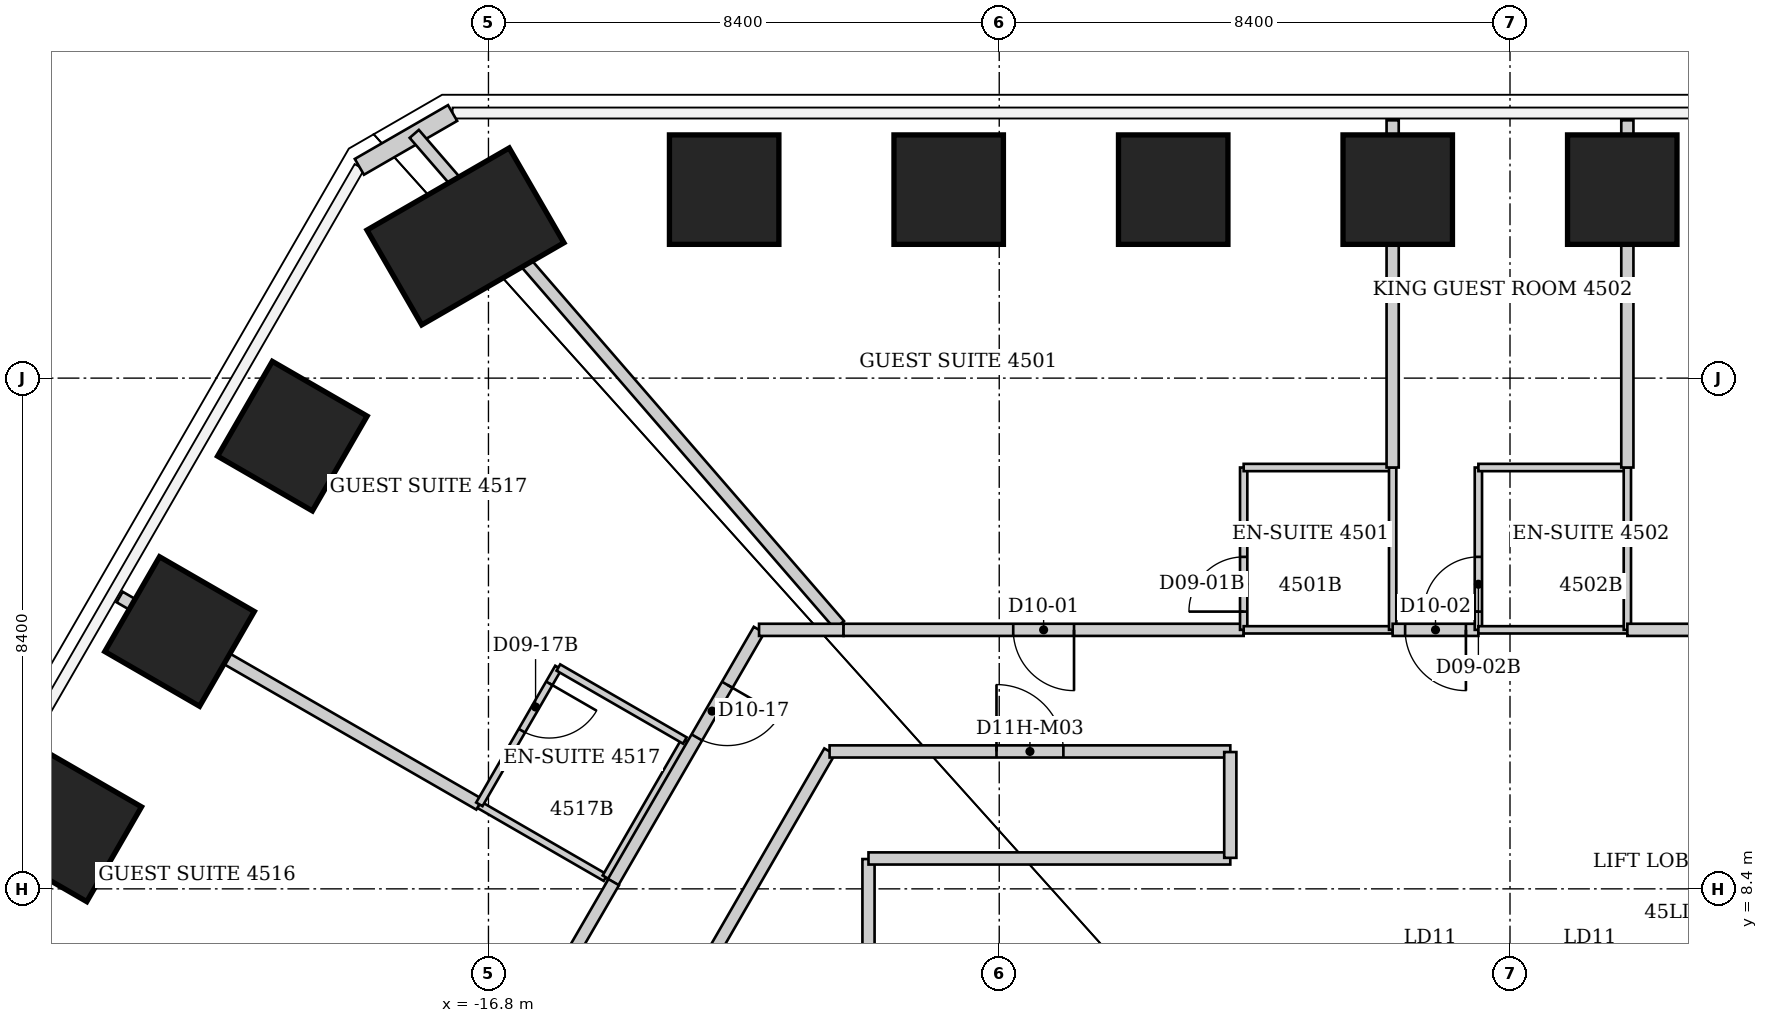
"""IFC4 building model, lengths in metres.
Left out: names, types, materials, properties, quantities, classifications, styles, units other than length and angle.
Written with IfcOpenShell. Run it as: python <this file> out.ifc"""

import sys

from ifc_helpers import new_model, si_unit, direction, frame, frame_2d, origin, origin_2d, place, context, subcontext, project, spatial, rectangle, extrude, element, fill, save


model = new_model("IFC4")
c1 = context("Model", 3, precision=1e-05, world=origin(), true_north=direction((0.0, 1.0)))
c2 = subcontext(c1, "Body", "Model", "MODEL_VIEW")
j1 = project(units=[si_unit("LENGTHUNIT", "METRE"), si_unit("PLANEANGLEUNIT", "RADIAN")], contexts=[c1])
p1 = place(None, origin())
s1 = spatial("IfcSite", under=j1, at=p1, CompositionType="ELEMENT")
p2 = place(p1, origin())
s2 = spatial("IfcBuilding", under=s1, at=p2, CompositionType="ELEMENT")
p3 = place(p2, frame((0.0, 0.0, 183.2)))
s3 = spatial("IfcBuildingStorey", under=s2, at=p3, CompositionType="ELEMENT", Elevation=183.2)
for number, where, z_axis, x_axis in (
    (1, (-12.924, 19.9, 0.0), (0.0, 0.0, 1.0), (0.0, 1.0, 0.0)),
    (2, (-9.231, 19.9, 0.0), (0.0, 0.0, 1.0), (0.0, 1.0, 0.0)),
    (3, (-5.539, 19.9, 0.0), (0.0, 0.0, 1.0), (0.0, 1.0, 0.0)),
    (4, (-1.846, 19.9, 0.0), (0.0, 0.0, 1.0), (0.0, 1.0, 0.0)),
    (5, (1.846, 19.9, 0.0), (0.0, 0.0, 1.0), (0.0, 1.0, 0.0)),
    (6, (-23.735, 9.419, 0.0), (0.0, 0.0, 1.0), (-0.866, 0.5, 0.0)),
    (7, (-21.88, 12.633, 0.0), (0.0, 0.0, 1.0), (-0.866, 0.5, 0.0)),
    (8, (-20.025, 15.846, 0.0), (0.0, 0.0, 1.0), (-0.866, 0.5, 0.0)),
):
    element("IfcColumn", number, at=place(p3, frame(where, z_axis=z_axis, x_axis=x_axis)), inside=s3, PredefinedType="COLUMN", context=c2, shape_type="SweptSolid", body=[
        extrude(rectangle(XDim=1.8, YDim=1.8, at=origin_2d()), origin(), (0.0, 0.0, 1.0), 3.8),
    ])
p4 = place(p3, frame((-17.178, 19.131, 0.0), z_axis=(0.0, 0.0, 1.0), x_axis=(-0.5, 0.866025403784, 0.0)))
e9 = element("IfcColumn", 9, at=p4, inside=s3, PredefinedType="COLUMN", context=c2, shape_type="SweptSolid", body=[
    extrude(rectangle(XDim=1.8, YDim=2.7, at=origin_2d()), origin(), (0.0, 0.0, 1.0), 3.8),
])
p5 = place(p3, frame((-18.923, 20.275, 0.0), z_axis=(0.0, 0.0, 1.0), x_axis=(0.866036293601, 0.499981137809, 0.0)))
e10 = element("IfcWall", 10, at=p5, inside=s3, PredefinedType="SOLIDWALL", context=c2, shape_type="SweptSolid", body=[
    extrude(rectangle(XDim=1.77, YDim=0.3, at=frame_2d((0.885, 0.0))), origin(), (0.0, 0.0, 1.0), 3.64),
])
p6 = place(p3, frame((-16.954, 9.783, 0.0), z_axis=(0.0, 0.0, 1.0), x_axis=(0.865862137391, -0.500282679124, 0.0)))
e11 = element("IfcWall", 11, at=p6, inside=s3, PredefinedType="PARTITIONING", context=c2, shape_type="SweptSolid", body=[
    extrude(rectangle(XDim=2.401, YDim=0.12, at=frame_2d((1.201, 0.0))), origin(), (0.0, 0.0, 1.0), 2.878),
])
p7 = place(p3, frame((-16.95, 9.79, 0.0), z_axis=(0.0, 0.0, 1.0), x_axis=(-0.866371236465, 0.499400521251, 0.0)))
e12 = element("IfcWall", 12, at=p7, inside=s3, PredefinedType="PARTITIONING", context=c2, shape_type="SweptSolid", body=[
    extrude(rectangle(XDim=6.829, YDim=0.2, at=frame_2d((3.414, 0.0))), origin(), (0.0, 0.0, 1.0), 2.878),
])
p8 = place(p3, frame((-15.65, 12.04, 0.0), z_axis=(0.0, 0.0, 1.0), x_axis=(-0.500291685314, -0.865856933682, 0.0)))
e13 = element("IfcWall", 13, at=p8, inside=s3, PredefinedType="PARTITIONING", context=c2, shape_type="SweptSolid", body=[
    extrude(rectangle(XDim=2.599, YDim=0.12, at=frame_2d((1.299, 0.0))), origin(), (0.0, 0.0, 1.0), 3.64),
])
p9 = place(p8, frame((0.3, 0.0, 0.0)))
e14 = element("IfcOpeningElement", 14, at=p9, cuts=e13, PredefinedType="OPENING", context=c2, shape_type="SweptSolid", body=[
    extrude(rectangle(XDim=0.9, YDim=2.03, at=frame_2d((0.45, 1.015))), frame((0.0, 0.06, 0.0), z_axis=(0.0, -1.0, 0.0), x_axis=(1.0, 0.0, 0.0)), (0.0, 0.0, 1.0), 0.12),
])
p10 = place(p3, frame((-14.87, 8.59, 0.0), z_axis=(0.0, 0.0, 1.0), x_axis=(0.500291685314, 0.865856933682, 0.0)))
e15 = element("IfcWall", 15, at=p10, inside=s3, PredefinedType="PARTITIONING", context=c2, shape_type="SweptSolid", body=[
    extrude(rectangle(XDim=2.599, YDim=0.12, at=frame_2d((1.299, 0.0))), origin(), (0.0, 0.0, 1.0), 3.64),
])
p11 = place(p3, frame((-14.827, 8.554, 0.0), z_axis=(0.0, 0.0, 1.0), x_axis=(0.865865073245, -0.500277597875, 0.0)))
e16 = element("IfcWall", 16, at=p11, inside=s3, PredefinedType="PARTITIONING", context=c2, shape_type="SweptSolid", body=[
    extrude(rectangle(XDim=0.089, YDim=0.2, at=frame_2d((0.044, 0.0))), origin(), (0.0, 0.0, 1.0), 3.64),
])
p12 = place(p3, frame((-14.75, 8.51, 0.0), z_axis=(0.0, 0.0, 1.0), x_axis=(0.500618647881, 0.86566793252, 0.0)))
e17 = element("IfcWall", 17, at=p12, inside=s3, PredefinedType="PARTITIONING", context=c2, shape_type="SweptSolid", body=[
    extrude(rectangle(XDim=4.794, YDim=0.2, at=frame_2d((2.397, 0.0))), origin(), (0.0, 0.0, 1.0), 3.64),
])
p13 = place(p12, frame((2.75, 0.0, 0.0)))
e18 = element("IfcOpeningElement", 18, at=p13, cuts=e17, PredefinedType="OPENING", context=c2, shape_type="SweptSolid", body=[
    extrude(rectangle(XDim=1.0, YDim=2.13, at=frame_2d((0.5, 1.065))), frame((0.0, 0.1, 0.0), z_axis=(0.0, -1.0, 0.0), x_axis=(1.0, 0.0, 0.0)), (0.0, 0.0, 1.0), 0.2),
])
p14 = place(p3, frame((-14.74, 8.51, 0.0), z_axis=(0.0, 0.0, 1.0), x_axis=(-0.501513165407, -0.865150012959, 0.0)))
e19 = element("IfcWall", 19, at=p14, inside=s3, PredefinedType="PARTITIONING", context=c2, shape_type="SweptSolid", body=[
    extrude(rectangle(XDim=4.6, YDim=0.2, at=frame_2d((2.3, 0.0))), origin(), (0.0, 0.0, 1.0), 3.64),
])
p15 = place(p14, frame((1.8, 0.0, 0.0)))
e20 = element("IfcOpeningElement", 20, at=p15, cuts=e19, PredefinedType="OPENING", context=c2, shape_type="SweptSolid", body=[
    extrude(rectangle(XDim=1.0, YDim=2.13, at=frame_2d((0.5, 1.065))), frame((0.0, 0.1, 0.0), z_axis=(0.0, -1.0, 0.0), x_axis=(1.0, 0.0, 0.0)), (0.0, 0.0, 1.0), 0.2),
])
p16 = place(p3, frame((-13.83, 6.09, 0.0), z_axis=(0.0, 0.0, 1.0), x_axis=(0.500248310865, 0.865881993967, 0.0)))
e21 = element("IfcWall", 21, at=p16, inside=s3, PredefinedType="PARTITIONING", context=c2, shape_type="SweptSolid", body=[
    extrude(rectangle(XDim=5.278, YDim=0.2, at=frame_2d((2.639, 0.0))), origin(), (0.0, 0.0, 1.0), 3.64),
])
p17 = place(p3, frame((-13.57, 10.84, 0.0), z_axis=(0.0, 0.0, 1.0), x_axis=(-0.866177122335, 0.499737123639, 0.0)))
e22 = element("IfcWall", 22, at=p17, inside=s3, PredefinedType="PARTITIONING", context=c2, shape_type="SweptSolid", body=[
    extrude(rectangle(XDim=2.401, YDim=0.12, at=frame_2d((1.201, 0.0))), origin(), (0.0, 0.0, 1.0), 3.64),
])
p18 = place(p3, frame((-11.19, 10.66, 0.0), z_axis=(0.0, 0.0, 1.0), x_axis=(1.0, 0.0, 0.0)))
e23 = element("IfcWall", 23, at=p18, inside=s3, PredefinedType="PARTITIONING", context=c2, shape_type="SweptSolid", body=[
    extrude(rectangle(XDim=6.59, YDim=0.2, at=frame_2d((3.295, 0.0))), origin(), (0.0, 0.0, 1.0), 3.64),
])
p19 = place(p18, frame((2.745, 0.0, 0.0)))
e24 = element("IfcOpeningElement", 24, at=p19, cuts=e23, PredefinedType="OPENING", context=c2, shape_type="SweptSolid", body=[
    extrude(rectangle(XDim=1.1, YDim=2.2, at=frame_2d((0.55, 1.1))), frame((0.0, 0.1, 0.0), z_axis=(0.0, -1.0, 0.0), x_axis=(1.0, 0.0, 0.0)), (0.0, 0.0, 1.0), 0.2),
])
p20 = place(p3, frame((-11.029, 12.74, 0.0), z_axis=(0.0, 0.0, 1.0), x_axis=(-0.654429261747, 0.756123231603, 0.0)))
e25 = element("IfcWall", 25, at=p20, inside=s3, PredefinedType="PARTITIONING", context=c2, shape_type="SweptSolid", body=[
    extrude(rectangle(XDim=10.683, YDim=0.2, at=frame_2d((5.342, 0.0))), origin(), (0.0, 0.0, 1.0), 3.64),
])
p21 = place(p3, frame((-10.96, 12.66, 0.0), z_axis=(0.0, 0.0, 1.0), x_axis=(-1.0, 0.0, 0.0)))
e26 = element("IfcWall", 26, at=p21, inside=s3, PredefinedType="PARTITIONING", context=c2, shape_type="SweptSolid", body=[
    extrude(rectangle(XDim=1.39, YDim=0.2, at=frame_2d((0.695, 0.0))), origin(), (0.0, 0.0, 1.0), 3.64),
])
p22 = place(p3, frame((-10.55, 8.89, 0.0), z_axis=(0.0, 0.0, 1.0), x_axis=(0.0, -1.0, 0.0)))
e27 = element("IfcWall", 27, at=p22, inside=s3, PredefinedType="PARTITIONING", context=c2, shape_type="SweptSolid", body=[
    extrude(rectangle(XDim=2.8, YDim=0.2, at=frame_2d((1.4, 0.0))), origin(), (0.0, 0.0, 1.0), 3.64),
])
p23 = place(p3, frame((-4.6, 8.9, 0.0), z_axis=(0.0, 0.0, 1.0), x_axis=(-1.0, 0.0, 0.0)))
e28 = element("IfcWall", 28, at=p23, inside=s3, PredefinedType="PARTITIONING", context=c2, shape_type="SweptSolid", body=[
    extrude(rectangle(XDim=5.95, YDim=0.2, at=frame_2d((2.975, 0.0))), origin(), (0.0, 0.0, 1.0), 3.64),
])
p24 = place(p3, frame((-4.6, 10.65, 0.0), z_axis=(0.0, 0.0, 1.0), x_axis=(0.0, -1.0, 0.0)))
e29 = element("IfcWall", 29, at=p24, inside=s3, PredefinedType="PARTITIONING", context=c2, shape_type="SweptSolid", body=[
    extrude(rectangle(XDim=1.74, YDim=0.2, at=frame_2d((0.87, 0.0))), origin(), (0.0, 0.0, 1.0), 3.64),
])
p25 = place(p3, frame((-4.38, 12.66, 0.0), z_axis=(0.0, 0.0, 1.0), x_axis=(-1.0, 0.0, 0.0)))
e30 = element("IfcWall", 30, at=p25, inside=s3, PredefinedType="PARTITIONING", context=c2, shape_type="SweptSolid", body=[
    extrude(rectangle(XDim=6.58, YDim=0.2, at=frame_2d((3.29, 0.0))), origin(), (0.0, 0.0, 1.0), 3.64),
])
p26 = place(p25, frame((2.79, 0.0, 0.0)))
e31 = element("IfcOpeningElement", 31, at=p26, cuts=e30, PredefinedType="OPENING", context=c2, shape_type="SweptSolid", body=[
    extrude(rectangle(XDim=1.0, YDim=2.13, at=frame_2d((0.5, 1.065))), frame((0.0, 0.1, 0.0), z_axis=(0.0, -1.0, 0.0), x_axis=(1.0, 0.0, 0.0)), (0.0, 0.0, 1.0), 0.2),
])
p27 = place(p3, frame((-4.38, 15.33, 0.0), z_axis=(0.0, 0.0, 1.0), x_axis=(0.0, -1.0, 0.0)))
e32 = element("IfcWall", 32, at=p27, inside=s3, PredefinedType="PARTITIONING", context=c2, shape_type="SweptSolid", body=[
    extrude(rectangle(XDim=2.67, YDim=0.12, at=frame_2d((1.335, 0.0))), origin(), (0.0, 0.0, 1.0), 3.64),
])
p28 = place(p27, frame((1.47, 0.0, 0.0)))
e33 = element("IfcOpeningElement", 33, at=p28, cuts=e32, PredefinedType="OPENING", context=c2, shape_type="SweptSolid", body=[
    extrude(rectangle(XDim=0.9, YDim=2.03, at=frame_2d((0.45, 1.015))), frame((0.0, 0.06, 0.0), z_axis=(0.0, -1.0, 0.0), x_axis=(1.0, 0.0, 0.0)), (0.0, 0.0, 1.0), 0.12),
])
for number, where, z_axis, x_axis in (
    (34, (-1.93, 12.66, 0.0), (0.0, 0.0, 1.0), (-1.0, 0.0, 0.0)),
    (35, (-1.93, 15.33, 0.0), (0.0, 0.0, 1.0), (-1.0, 0.0, 0.0)),
):
    element("IfcWall", number, at=place(p3, frame(where, z_axis=z_axis, x_axis=x_axis)), inside=s3, PredefinedType="PARTITIONING", context=c2, shape_type="SweptSolid", body=[
        extrude(rectangle(XDim=2.45, YDim=0.12, at=frame_2d((1.225, 0.0))), origin(), (0.0, 0.0, 1.0), 3.64),
    ])
p29 = place(p3, frame((-1.93, 15.33, 0.0), z_axis=(0.0, 0.0, 1.0), x_axis=(0.0, -1.0, 0.0)))
e36 = element("IfcWall", 36, at=p29, inside=s3, PredefinedType="PARTITIONING", context=c2, shape_type="SweptSolid", body=[
    extrude(rectangle(XDim=2.67, YDim=0.12, at=frame_2d((1.335, 0.0))), origin(), (0.0, 0.0, 1.0), 3.023),
])
p30 = place(p3, frame((-1.93, 21.04, 0.0), z_axis=(0.0, 0.0, 1.0), x_axis=(0.0, -1.0, 0.0)))
e37 = element("IfcWall", 37, at=p30, inside=s3, PredefinedType="PARTITIONING", context=c2, shape_type="SweptSolid", body=[
    extrude(rectangle(XDim=5.71, YDim=0.2, at=frame_2d((2.855, 0.0))), origin(), (0.0, 0.0, 1.0), 3.023),
])
p31 = place(p3, frame((-0.52, 12.66, 0.0), z_axis=(0.0, 0.0, 1.0), x_axis=(-1.0, 0.0, 0.0)))
e38 = element("IfcWall", 38, at=p31, inside=s3, PredefinedType="PARTITIONING", context=c2, shape_type="SweptSolid", body=[
    extrude(rectangle(XDim=1.41, YDim=0.2, at=frame_2d((0.705, 0.0))), origin(), (0.0, 0.0, 1.0), 3.64),
])
p32 = place(p31, frame((0.205, 0.0, 0.0)))
e39 = element("IfcOpeningElement", 39, at=p32, cuts=e38, PredefinedType="OPENING", context=c2, shape_type="SweptSolid", body=[
    extrude(rectangle(XDim=1.0, YDim=2.13, at=frame_2d((0.5, 1.065))), frame((0.0, 0.1, 0.0), z_axis=(0.0, -1.0, 0.0), x_axis=(1.0, 0.0, 0.0)), (0.0, 0.0, 1.0), 0.2),
])
p33 = place(p3, frame((-0.52, 15.33, 0.0), z_axis=(0.0, 0.0, 1.0), x_axis=(0.0, -1.0, 0.0)))
e40 = element("IfcWall", 40, at=p33, inside=s3, PredefinedType="PARTITIONING", context=c2, shape_type="SweptSolid", body=[
    extrude(rectangle(XDim=2.67, YDim=0.12, at=frame_2d((1.335, 0.0))), origin(), (0.0, 0.0, 1.0), 3.64),
])
p34 = place(p33, frame((1.47, 0.0, 0.0)))
e41 = element("IfcOpeningElement", 41, at=p34, cuts=e40, PredefinedType="OPENING", context=c2, shape_type="SweptSolid", body=[
    extrude(rectangle(XDim=0.9, YDim=2.03, at=frame_2d((0.45, 1.015))), frame((0.0, 0.06, 0.0), z_axis=(0.0, -1.0, 0.0), x_axis=(1.0, 0.0, 0.0)), (0.0, 0.0, 1.0), 0.12),
])
for number, where, z_axis, x_axis in (
    (42, (1.93, 12.66, 0.0), (0.0, 0.0, 1.0), (-1.0, 0.0, 0.0)),
    (43, (1.93, 15.33, 0.0), (0.0, 0.0, 1.0), (-1.0, 0.0, 0.0)),
):
    element("IfcWall", number, at=place(p3, frame(where, z_axis=z_axis, x_axis=x_axis)), inside=s3, PredefinedType="PARTITIONING", context=c2, shape_type="SweptSolid", body=[
        extrude(rectangle(XDim=2.45, YDim=0.12, at=frame_2d((1.225, 0.0))), origin(), (0.0, 0.0, 1.0), 3.64),
    ])
p35 = place(p3, frame((1.93, 15.33, 0.0), z_axis=(0.0, 0.0, 1.0), x_axis=(0.0, -1.0, 0.0)))
e44 = element("IfcWall", 44, at=p35, inside=s3, PredefinedType="PARTITIONING", context=c2, shape_type="SweptSolid", body=[
    extrude(rectangle(XDim=2.67, YDim=0.12, at=frame_2d((1.335, 0.0))), origin(), (0.0, 0.0, 1.0), 3.023),
])
p36 = place(p3, frame((1.93, 21.04, 0.0), z_axis=(0.0, 0.0, 1.0), x_axis=(0.0, -1.0, 0.0)))
e45 = element("IfcWall", 45, at=p36, inside=s3, PredefinedType="PARTITIONING", context=c2, shape_type="SweptSolid", body=[
    extrude(rectangle(XDim=5.71, YDim=0.2, at=frame_2d((2.855, 0.0))), origin(), (0.0, 0.0, 1.0), 3.023),
])
p37 = place(p3, frame((8.53, 12.66, 0.0), z_axis=(0.0, 0.0, 1.0), x_axis=(-1.0, 0.0, 0.0)))
e46 = element("IfcWall", 46, at=p37, inside=s3, PredefinedType="PARTITIONING", context=c2, shape_type="SweptSolid", body=[
    extrude(rectangle(XDim=6.6, YDim=0.2, at=frame_2d((3.3, 0.0))), origin(), (0.0, 0.0, 1.0), 3.64),
])
p38 = place(p37, frame((2.8, 0.0, 0.0)))
e47 = element("IfcOpeningElement", 47, at=p38, cuts=e46, PredefinedType="OPENING", context=c2, shape_type="SweptSolid", body=[
    extrude(rectangle(XDim=1.0, YDim=2.13, at=frame_2d((0.5, 1.065))), frame((0.0, 0.1, 0.0), z_axis=(0.0, -1.0, 0.0), x_axis=(1.0, 0.0, 0.0)), (0.0, 0.0, 1.0), 0.2),
])
p39 = place(p26, origin())
e48 = element("IfcDoor", 48, at=p39, inside=s3, OperationType="SINGLE_SWING_LEFT", PredefinedType="DOOR", context=c2, shape_type="SweptSolid", body=[
    extrude(rectangle(XDim=1.0, YDim=2.13, at=frame_2d((0.5, 1.065))), frame((0.0, 0.025, 0.0), z_axis=(0.0, -1.0, 0.0), x_axis=(1.0, 0.0, 0.0)), (0.0, 0.0, 1.0), 0.05),
])
fill(e31, e48)
p40 = place(p28, origin())
e49 = element("IfcDoor", 49, at=p40, inside=s3, OperationType="SINGLE_SWING_RIGHT", PredefinedType="DOOR", context=c2, shape_type="SweptSolid", body=[
    extrude(rectangle(XDim=0.9, YDim=2.03, at=frame_2d((0.45, 1.015))), frame((0.0, 0.025, 0.0), z_axis=(0.0, -1.0, 0.0), x_axis=(1.0, 0.0, 0.0)), (0.0, 0.0, 1.0), 0.05),
])
fill(e33, e49)
p41 = place(p32, origin())
e50 = element("IfcDoor", 50, at=p41, inside=s3, OperationType="SINGLE_SWING_LEFT", PredefinedType="DOOR", context=c2, shape_type="SweptSolid", body=[
    extrude(rectangle(XDim=1.0, YDim=2.13, at=frame_2d((0.5, 1.065))), frame((0.0, 0.025, 0.0), z_axis=(0.0, -1.0, 0.0), x_axis=(1.0, 0.0, 0.0)), (0.0, 0.0, 1.0), 0.05),
])
fill(e39, e50)
p42 = place(p34, origin())
e51 = element("IfcDoor", 51, at=p42, inside=s3, OperationType="SINGLE_SWING_RIGHT", PredefinedType="DOOR", context=c2, shape_type="SweptSolid", body=[
    extrude(rectangle(XDim=0.9, YDim=2.03, at=frame_2d((0.45, 1.015))), frame((0.0, 0.025, 0.0), z_axis=(0.0, -1.0, 0.0), x_axis=(1.0, 0.0, 0.0)), (0.0, 0.0, 1.0), 0.05),
])
fill(e41, e51)
p43 = place(p13, origin())
e52 = element("IfcDoor", 52, at=p43, inside=s3, OperationType="SINGLE_SWING_RIGHT", PredefinedType="DOOR", context=c2, shape_type="SweptSolid", body=[
    extrude(rectangle(XDim=1.0, YDim=2.13, at=frame_2d((0.5, 1.065))), frame((0.0, 0.025, 0.0), z_axis=(0.0, -1.0, 0.0), x_axis=(1.0, 0.0, 0.0)), (0.0, 0.0, 1.0), 0.05),
])
fill(e18, e52)
p44 = place(p9, origin())
e53 = element("IfcDoor", 53, at=p44, inside=s3, OperationType="SINGLE_SWING_LEFT", PredefinedType="DOOR", context=c2, shape_type="SweptSolid", body=[
    extrude(rectangle(XDim=0.9, YDim=2.03, at=frame_2d((0.45, 1.015))), frame((0.0, 0.025, 0.0), z_axis=(0.0, -1.0, 0.0), x_axis=(1.0, 0.0, 0.0)), (0.0, 0.0, 1.0), 0.05),
])
fill(e14, e53)
p45 = place(p19, origin())
e54 = element("IfcDoor", 54, at=p45, inside=s3, OperationType="SINGLE_SWING_LEFT", PredefinedType="DOOR", context=c2, shape_type="SweptSolid", body=[
    extrude(rectangle(XDim=1.1, YDim=2.2, at=frame_2d((0.55, 1.1))), frame((0.0, 0.025, 0.0), z_axis=(0.0, -1.0, 0.0), x_axis=(1.0, 0.0, 0.0)), (0.0, 0.0, 1.0), 0.05),
])
fill(e24, e54)
save(model, sys.argv[1])
